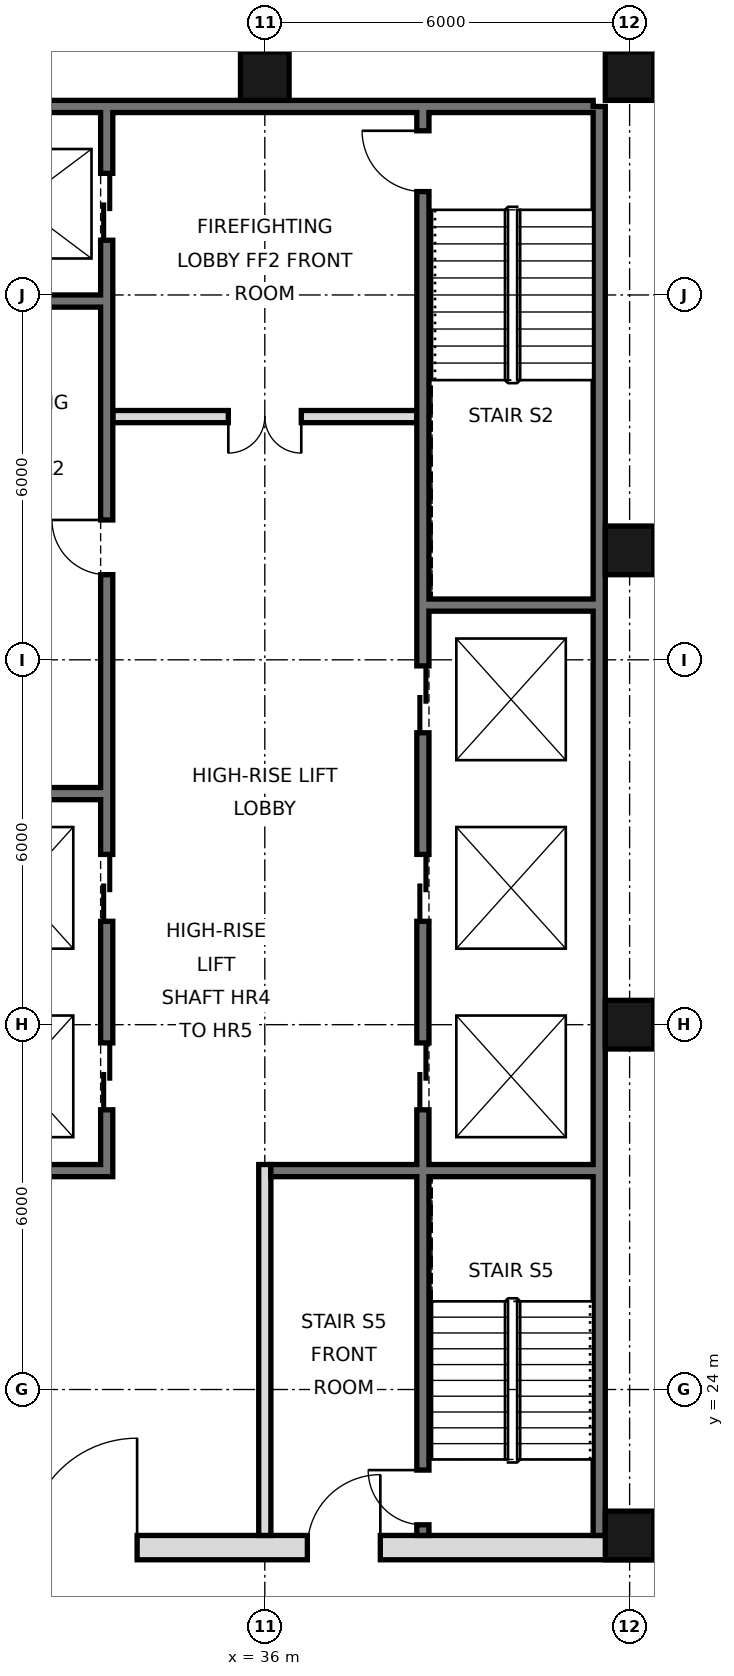
"""IFC4 building model, lengths in metres.
Left out: names, types, materials, properties, quantities, classifications, styles, units other than length and angle.
Written with IfcOpenShell. Run it as: python <this file> out.ifc"""

import sys

from ifc_helpers import new_model, si_unit, direction, frame, frame_2d, origin, origin_2d, place, context, subcontext, project, spatial, rectangle, hollow_rectangle, extrude, element, fill, save


model = new_model("IFC4")
c1 = context("Model", 3, precision=1e-05, world=origin(), true_north=direction((0.0, 1.0)))
c2 = subcontext(c1, "Body", "Model", "MODEL_VIEW")
j1 = project(units=[si_unit("LENGTHUNIT", "METRE"), si_unit("PLANEANGLEUNIT", "RADIAN")], contexts=[c1])
p1 = place(None, origin())
s1 = spatial("IfcSite", under=j1, at=p1, CompositionType="ELEMENT")
p2 = place(p1, origin())
s2 = spatial("IfcBuilding", under=s1, at=p2, CompositionType="ELEMENT")
p3 = place(p2, frame((0.0, 0.0, 226.2)))
s3 = spatial("IfcBuildingStorey", under=s2, at=p3, CompositionType="ELEMENT", Elevation=226.2)
for number, where, z_axis, x_axis in (
    (1, (36.0, 45.6, 0.0), (0.0, 0.0, 1.0), (1.0, 0.0, 0.0)),
    (2, (42.0, 21.6, 0.0), (0.0, 0.0, 1.0), (1.0, 0.0, 0.0)),
    (3, (42.0, 30.0, 0.0), (0.0, 0.0, 1.0), (1.0, 0.0, 0.0)),
    (4, (42.0, 37.8, 0.0), (0.0, 0.0, 1.0), (1.0, 0.0, 0.0)),
    (5, (42.0, 45.6, 0.0), (0.0, 0.0, 1.0), (1.0, 0.0, 0.0)),
):
    element("IfcColumn", number, at=place(p3, frame(where, z_axis=z_axis, x_axis=x_axis)), inside=s3, PredefinedType="COLUMN", context=c2, shape_type="SweptSolid", body=[
        extrude(hollow_rectangle(XDim=0.8, YDim=0.8, WallThickness=0.04, at=origin_2d()), origin(), (0.0, 0.0, 1.0), 3.6),
    ])
p4 = place(p3, frame((41.5, 21.6, 0.0), z_axis=(0.0, 0.0, 1.0), x_axis=(0.0, 1.0, 0.0)))
e6 = element("IfcWall", 6, at=p4, inside=s3, PredefinedType="SOLIDWALL", context=c2, shape_type="SweptSolid", body=[
    extrude(rectangle(XDim=23.5, YDim=0.2, at=frame_2d((11.75, 0.0))), origin(), (0.0, 0.0, 1.0), 3.42),
])
p5 = place(p3, frame((6.6, 45.1, 0.0), z_axis=(0.0, 0.0, 1.0), x_axis=(1.0, 0.0, 0.0)))
e7 = element("IfcWall", 7, at=p5, inside=s3, PredefinedType="SOLIDWALL", context=c2, shape_type="SweptSolid", body=[
    extrude(rectangle(XDim=34.8, YDim=0.2, at=frame_2d((17.4, 0.0))), origin(), (0.0, 0.0, 1.0), 3.42),
])
p6 = place(p3, frame((5.6, 21.4, 0.0), z_axis=(0.0, 0.0, 1.0), x_axis=(1.0, 0.0, 0.0)))
e8 = element("IfcWall", 8, at=p6, inside=s3, PredefinedType="SOLIDWALL", context=c2, shape_type="SweptSolid", body=[
    extrude(rectangle(XDim=36.8, YDim=0.4, at=frame_2d((18.4, 0.0))), origin(), (0.0, 0.0, 1.0), 3.42),
])
p7 = place(p6, frame((8.5, 0.0, 0.0)))
e9 = element("IfcOpeningElement", 9, at=p7, cuts=e8, PredefinedType="OPENING", context=c2, shape_type="SweptSolid", body=[
    extrude(rectangle(XDim=1.8, YDim=2.1, at=frame_2d((0.9, 1.05))), frame((0.0, 0.21, 0.0), z_axis=(0.0, -1.0, 0.0), x_axis=(1.0, 0.0, 0.0)), (0.0, 0.0, 1.0), 0.42),
])
p8 = place(p6, frame((17.5, 0.0, 0.0)))
e10 = element("IfcOpeningElement", 10, at=p8, cuts=e8, PredefinedType="OPENING", context=c2, shape_type="SweptSolid", body=[
    extrude(rectangle(XDim=1.8, YDim=2.1, at=frame_2d((0.9, 1.05))), frame((0.0, 0.21, 0.0), z_axis=(0.0, -1.0, 0.0), x_axis=(1.0, 0.0, 0.0)), (0.0, 0.0, 1.0), 0.42),
])
p9 = place(p6, frame((26.5, 0.0, 0.0)))
e11 = element("IfcOpeningElement", 11, at=p9, cuts=e8, PredefinedType="OPENING", context=c2, shape_type="SweptSolid", body=[
    extrude(rectangle(XDim=1.8, YDim=2.1, at=frame_2d((0.9, 1.05))), frame((0.0, 0.21, 0.0), z_axis=(0.0, -1.0, 0.0), x_axis=(1.0, 0.0, 0.0)), (0.0, 0.0, 1.0), 0.42),
])
p10 = place(p6, frame((4.5, 0.0, 0.0)))
e12 = element("IfcOpeningElement", 12, at=p10, cuts=e8, PredefinedType="OPENING", context=c2, shape_type="SweptSolid", body=[
    extrude(rectangle(XDim=1.2, YDim=2.1, at=frame_2d((0.6, 1.05))), frame((0.0, 0.21, 0.0), z_axis=(0.0, -1.0, 0.0), x_axis=(1.0, 0.0, 0.0)), (0.0, 0.0, 1.0), 0.42),
])
p11 = place(p6, frame((31.1, 0.0, 0.0)))
e13 = element("IfcOpeningElement", 13, at=p11, cuts=e8, PredefinedType="OPENING", context=c2, shape_type="SweptSolid", body=[
    extrude(rectangle(XDim=1.2, YDim=2.1, at=frame_2d((0.6, 1.05))), frame((0.0, 0.21, 0.0), z_axis=(0.0, -1.0, 0.0), x_axis=(1.0, 0.0, 0.0)), (0.0, 0.0, 1.0), 0.42),
])
p12 = place(p3, frame((33.4, 27.5, 0.0), z_axis=(0.0, 0.0, 1.0), x_axis=(0.0, 1.0, 0.0)))
e14 = element("IfcWall", 14, at=p12, inside=s3, PredefinedType="SOLIDWALL", context=c2, shape_type="SweptSolid", body=[
    extrude(rectangle(XDim=17.5, YDim=0.2, at=frame_2d((8.75, 0.0))), origin(), (0.0, 0.0, 1.0), 3.42),
])
p13 = place(p12, frame((1.1, 0.0, 0.0)))
e15 = element("IfcOpeningElement", 15, at=p13, cuts=e14, PredefinedType="OPENING", context=c2, shape_type="SweptSolid", body=[
    extrude(rectangle(XDim=1.1, YDim=2.1, at=frame_2d((0.55, 1.05))), frame((0.0, 0.11, 0.0), z_axis=(0.0, -1.0, 0.0), x_axis=(1.0, 0.0, 0.0)), (0.0, 0.0, 1.0), 0.22),
])
p14 = place(p12, frame((4.2, 0.0, 0.0)))
e16 = element("IfcOpeningElement", 16, at=p14, cuts=e14, PredefinedType="OPENING", context=c2, shape_type="SweptSolid", body=[
    extrude(rectangle(XDim=1.1, YDim=2.1, at=frame_2d((0.55, 1.05))), frame((0.0, 0.11, 0.0), z_axis=(0.0, -1.0, 0.0), x_axis=(1.0, 0.0, 0.0)), (0.0, 0.0, 1.0), 0.22),
])
p15 = place(p12, frame((15.4, 0.0, 0.0)))
e17 = element("IfcOpeningElement", 17, at=p15, cuts=e14, PredefinedType="OPENING", context=c2, shape_type="SweptSolid", body=[
    extrude(rectangle(XDim=1.1, YDim=2.1, at=frame_2d((0.55, 1.05))), frame((0.0, 0.11, 0.0), z_axis=(0.0, -1.0, 0.0), x_axis=(1.0, 0.0, 0.0)), (0.0, 0.0, 1.0), 0.22),
])
p16 = place(p12, frame((9.9, 0.0, 0.0)))
e18 = element("IfcOpeningElement", 18, at=p16, cuts=e14, PredefinedType="OPENING", context=c2, shape_type="SweptSolid", body=[
    extrude(rectangle(XDim=0.9, YDim=2.1, at=frame_2d((0.45, 1.05))), frame((0.0, 0.11, 0.0), z_axis=(0.0, -1.0, 0.0), x_axis=(1.0, 0.0, 0.0)), (0.0, 0.0, 1.0), 0.22),
])
p17 = place(p3, frame((36.0, 21.6, 0.0), z_axis=(0.0, 0.0, 1.0), x_axis=(0.0, 1.0, 0.0)))
e19 = element("IfcWall", 19, at=p17, inside=s3, PredefinedType="PARTITIONING", context=c2, shape_type="SweptSolid", body=[
    extrude(rectangle(XDim=6.1, YDim=0.2, at=frame_2d((3.05, 0.0))), origin(), (0.0, 0.0, 1.0), 3.42),
])
p18 = place(p3, frame((38.6, 21.6, 0.0), z_axis=(0.0, 0.0, 1.0), x_axis=(0.0, 1.0, 0.0)))
e20 = element("IfcWall", 20, at=p18, inside=s3, PredefinedType="SOLIDWALL", context=c2, shape_type="SweptSolid", body=[
    extrude(rectangle(XDim=23.4, YDim=0.2, at=frame_2d((11.7, 0.0))), origin(), (0.0, 0.0, 1.0), 3.42),
])
p19 = place(p18, frame((7.0, 0.0, 0.0)))
e21 = element("IfcOpeningElement", 21, at=p19, cuts=e20, PredefinedType="OPENING", context=c2, shape_type="SweptSolid", body=[
    extrude(rectangle(XDim=1.1, YDim=2.1, at=frame_2d((0.55, 1.05))), frame((0.0, 0.11, 0.0), z_axis=(0.0, -1.0, 0.0), x_axis=(1.0, 0.0, 0.0)), (0.0, 0.0, 1.0), 0.22),
])
p20 = place(p18, frame((10.1, 0.0, 0.0)))
e22 = element("IfcOpeningElement", 22, at=p20, cuts=e20, PredefinedType="OPENING", context=c2, shape_type="SweptSolid", body=[
    extrude(rectangle(XDim=1.1, YDim=2.1, at=frame_2d((0.55, 1.05))), frame((0.0, 0.11, 0.0), z_axis=(0.0, -1.0, 0.0), x_axis=(1.0, 0.0, 0.0)), (0.0, 0.0, 1.0), 0.22),
])
p21 = place(p18, frame((13.2, 0.0, 0.0)))
e23 = element("IfcOpeningElement", 23, at=p21, cuts=e20, PredefinedType="OPENING", context=c2, shape_type="SweptSolid", body=[
    extrude(rectangle(XDim=1.1, YDim=2.1, at=frame_2d((0.55, 1.05))), frame((0.0, 0.11, 0.0), z_axis=(0.0, -1.0, 0.0), x_axis=(1.0, 0.0, 0.0)), (0.0, 0.0, 1.0), 0.22),
])
p22 = place(p18, frame((22.1, 0.0, 0.0)))
e24 = element("IfcOpeningElement", 24, at=p22, cuts=e20, PredefinedType="OPENING", context=c2, shape_type="SweptSolid", body=[
    extrude(rectangle(XDim=1.0, YDim=2.1, at=frame_2d((0.5, 1.05))), frame((0.0, 0.11, 0.0), z_axis=(0.0, -1.0, 0.0), x_axis=(1.0, 0.0, 0.0)), (0.0, 0.0, 1.0), 0.22),
])
p23 = place(p18, frame((0.175, 0.0, 0.0)))
e25 = element("IfcOpeningElement", 25, at=p23, cuts=e20, PredefinedType="OPENING", context=c2, shape_type="SweptSolid", body=[
    extrude(rectangle(XDim=0.9, YDim=2.1, at=frame_2d((0.45, 1.05))), frame((0.0, 0.11, 0.0), z_axis=(0.0, -1.0, 0.0), x_axis=(1.0, 0.0, 0.0)), (0.0, 0.0, 1.0), 0.22),
])
p24 = place(p3, frame((30.6, 27.6, 0.0), z_axis=(0.0, 0.0, 1.0), x_axis=(1.0, 0.0, 0.0)))
e26 = element("IfcWall", 26, at=p24, inside=s3, PredefinedType="SOLIDWALL", context=c2, shape_type="SweptSolid", body=[
    extrude(rectangle(XDim=2.7, YDim=0.2, at=frame_2d((1.35, 0.0))), origin(), (0.0, 0.0, 1.0), 3.42),
])
p25 = place(p3, frame((36.1, 27.6, 0.0), z_axis=(0.0, 0.0, 1.0), x_axis=(1.0, 0.0, 0.0)))
e27 = element("IfcWall", 27, at=p25, inside=s3, PredefinedType="SOLIDWALL", context=c2, shape_type="SweptSolid", body=[
    extrude(rectangle(XDim=5.3, YDim=0.2, at=frame_2d((2.65, 0.0))), origin(), (0.0, 0.0, 1.0), 3.42),
])
for number, where, z_axis, x_axis in (
    (28, (30.6, 33.8, 0.0), (0.0, 0.0, 1.0), (1.0, 0.0, 0.0)),
    (29, (38.7, 36.9, 0.0), (0.0, 0.0, 1.0), (1.0, 0.0, 0.0)),
):
    element("IfcWall", number, at=place(p3, frame(where, z_axis=z_axis, x_axis=x_axis)), inside=s3, PredefinedType="SOLIDWALL", context=c2, shape_type="SweptSolid", body=[
        extrude(rectangle(XDim=2.7, YDim=0.2, at=frame_2d((1.35, 0.0))), origin(), (0.0, 0.0, 1.0), 3.42),
    ])
p26 = place(p3, frame((33.5, 40.0, 0.0), z_axis=(0.0, 0.0, 1.0), x_axis=(1.0, 0.0, 0.0)))
e30 = element("IfcWall", 30, at=p26, inside=s3, PredefinedType="PARTITIONING", context=c2, shape_type="SweptSolid", body=[
    extrude(rectangle(XDim=5.0, YDim=0.2, at=frame_2d((2.5, 0.0))), origin(), (0.0, 0.0, 1.0), 3.42),
])
p27 = place(p26, frame((1.9, 0.0, 0.0)))
e31 = element("IfcOpeningElement", 31, at=p27, cuts=e30, PredefinedType="OPENING", context=c2, shape_type="SweptSolid", body=[
    extrude(rectangle(XDim=1.2, YDim=2.1, at=frame_2d((0.6, 1.05))), frame((0.0, 0.11, 0.0), z_axis=(0.0, -1.0, 0.0), x_axis=(1.0, 0.0, 0.0)), (0.0, 0.0, 1.0), 0.22),
])
p28 = place(p3, frame((30.6, 41.9, 0.0), z_axis=(0.0, 0.0, 1.0), x_axis=(1.0, 0.0, 0.0)))
e32 = element("IfcWall", 32, at=p28, inside=s3, PredefinedType="SOLIDWALL", context=c2, shape_type="SweptSolid", body=[
    extrude(rectangle(XDim=2.7, YDim=0.2, at=frame_2d((1.35, 0.0))), origin(), (0.0, 0.0, 1.0), 3.42),
])
p29 = place(p9, frame((1.8, 0.0, 0.0), z_axis=(0.0, 0.0, 1.0), x_axis=(-1.0, 0.0, 0.0)))
e33 = element("IfcDoor", 33, at=p29, inside=s3, OperationType="SINGLE_SWING_LEFT", PredefinedType="DOOR", context=c2, shape_type="SweptSolid", body=[
    extrude(rectangle(XDim=1.8, YDim=2.1, at=frame_2d((0.9, 1.05))), frame((0.0, 0.025, 0.0), z_axis=(0.0, -1.0, 0.0), x_axis=(1.0, 0.0, 0.0)), (0.0, 0.0, 1.0), 0.05),
])
fill(e11, e33)
p30 = place(p11, frame((1.2, 0.0, 0.0), z_axis=(0.0, 0.0, 1.0), x_axis=(-1.0, 0.0, 0.0)))
e34 = element("IfcDoor", 34, at=p30, inside=s3, OperationType="SINGLE_SWING_LEFT", PredefinedType="DOOR", context=c2, shape_type="SweptSolid", body=[
    extrude(rectangle(XDim=1.2, YDim=2.1, at=frame_2d((0.6, 1.05))), frame((0.0, 0.025, 0.0), z_axis=(0.0, -1.0, 0.0), x_axis=(1.0, 0.0, 0.0)), (0.0, 0.0, 1.0), 0.05),
])
fill(e13, e34)
p31 = place(p27, frame((1.2, 0.0, 0.0), z_axis=(0.0, 0.0, 1.0), x_axis=(-1.0, 0.0, 0.0)))
e35 = element("IfcDoor", 35, at=p31, inside=s3, OperationType="DOUBLE_DOOR_SINGLE_SWING", PredefinedType="DOOR", context=c2, shape_type="SweptSolid", body=[
    extrude(rectangle(XDim=1.2, YDim=2.1, at=frame_2d((0.6, 1.05))), frame((0.0, 0.025, 0.0), z_axis=(0.0, -1.0, 0.0), x_axis=(1.0, 0.0, 0.0)), (0.0, 0.0, 1.0), 0.05),
])
fill(e31, e35)
p32 = place(p19, origin())
e36 = element("IfcDoor", 36, at=p32, inside=s3, OperationType="DOUBLE_DOOR_SLIDING", PredefinedType="DOOR", context=c2, shape_type="SweptSolid", body=[
    extrude(rectangle(XDim=1.1, YDim=2.1, at=frame_2d((0.55, 1.05))), frame((0.0, 0.025, 0.0), z_axis=(0.0, -1.0, 0.0), x_axis=(1.0, 0.0, 0.0)), (0.0, 0.0, 1.0), 0.05),
])
fill(e21, e36)
p33 = place(p20, origin())
e37 = element("IfcDoor", 37, at=p33, inside=s3, OperationType="DOUBLE_DOOR_SLIDING", PredefinedType="DOOR", context=c2, shape_type="SweptSolid", body=[
    extrude(rectangle(XDim=1.1, YDim=2.1, at=frame_2d((0.55, 1.05))), frame((0.0, 0.025, 0.0), z_axis=(0.0, -1.0, 0.0), x_axis=(1.0, 0.0, 0.0)), (0.0, 0.0, 1.0), 0.05),
])
fill(e22, e37)
p34 = place(p21, origin())
e38 = element("IfcDoor", 38, at=p34, inside=s3, OperationType="DOUBLE_DOOR_SLIDING", PredefinedType="DOOR", context=c2, shape_type="SweptSolid", body=[
    extrude(rectangle(XDim=1.1, YDim=2.1, at=frame_2d((0.55, 1.05))), frame((0.0, 0.025, 0.0), z_axis=(0.0, -1.0, 0.0), x_axis=(1.0, 0.0, 0.0)), (0.0, 0.0, 1.0), 0.05),
])
fill(e23, e38)
p35 = place(p13, origin())
e39 = element("IfcDoor", 39, at=p35, inside=s3, OperationType="DOUBLE_DOOR_SLIDING", PredefinedType="DOOR", context=c2, shape_type="SweptSolid", body=[
    extrude(rectangle(XDim=1.1, YDim=2.1, at=frame_2d((0.55, 1.05))), frame((0.0, 0.025, 0.0), z_axis=(0.0, -1.0, 0.0), x_axis=(1.0, 0.0, 0.0)), (0.0, 0.0, 1.0), 0.05),
])
fill(e15, e39)
p36 = place(p14, origin())
e40 = element("IfcDoor", 40, at=p36, inside=s3, OperationType="DOUBLE_DOOR_SLIDING", PredefinedType="DOOR", context=c2, shape_type="SweptSolid", body=[
    extrude(rectangle(XDim=1.1, YDim=2.1, at=frame_2d((0.55, 1.05))), frame((0.0, 0.025, 0.0), z_axis=(0.0, -1.0, 0.0), x_axis=(1.0, 0.0, 0.0)), (0.0, 0.0, 1.0), 0.05),
])
fill(e16, e40)
p37 = place(p15, origin())
e41 = element("IfcDoor", 41, at=p37, inside=s3, OperationType="DOUBLE_DOOR_SLIDING", PredefinedType="DOOR", context=c2, shape_type="SweptSolid", body=[
    extrude(rectangle(XDim=1.1, YDim=2.1, at=frame_2d((0.55, 1.05))), frame((0.0, 0.025, 0.0), z_axis=(0.0, -1.0, 0.0), x_axis=(1.0, 0.0, 0.0)), (0.0, 0.0, 1.0), 0.05),
])
fill(e17, e41)
p38 = place(p22, frame((1.0, 0.0, 0.0), z_axis=(0.0, 0.0, 1.0), x_axis=(-1.0, 0.0, 0.0)))
e42 = element("IfcDoor", 42, at=p38, inside=s3, OperationType="SINGLE_SWING_LEFT", PredefinedType="DOOR", context=c2, shape_type="SweptSolid", body=[
    extrude(rectangle(XDim=1.0, YDim=2.1, at=frame_2d((0.5, 1.05))), frame((0.0, 0.025, 0.0), z_axis=(0.0, -1.0, 0.0), x_axis=(1.0, 0.0, 0.0)), (0.0, 0.0, 1.0), 0.05),
])
fill(e24, e42)
p39 = place(p23, frame((0.9, 0.0, 0.0), z_axis=(0.0, 0.0, 1.0), x_axis=(-1.0, 0.0, 0.0)))
e43 = element("IfcDoor", 43, at=p39, inside=s3, OperationType="SINGLE_SWING_LEFT", PredefinedType="DOOR", context=c2, shape_type="SweptSolid", body=[
    extrude(rectangle(XDim=0.9, YDim=2.1, at=frame_2d((0.45, 1.05))), frame((0.0, 0.025, 0.0), z_axis=(0.0, -1.0, 0.0), x_axis=(1.0, 0.0, 0.0)), (0.0, 0.0, 1.0), 0.05),
])
fill(e25, e43)
p40 = place(p16, frame((0.9, 0.0, 0.0), z_axis=(0.0, 0.0, 1.0), x_axis=(-1.0, 0.0, 0.0)))
e44 = element("IfcDoor", 44, at=p40, inside=s3, OperationType="SINGLE_SWING_LEFT", PredefinedType="DOOR", context=c2, shape_type="SweptSolid", body=[
    extrude(rectangle(XDim=0.9, YDim=2.1, at=frame_2d((0.45, 1.05))), frame((0.0, 0.025, 0.0), z_axis=(0.0, -1.0, 0.0), x_axis=(1.0, 0.0, 0.0)), (0.0, 0.0, 1.0), 0.05),
])
fill(e18, e44)
save(model, sys.argv[1])
